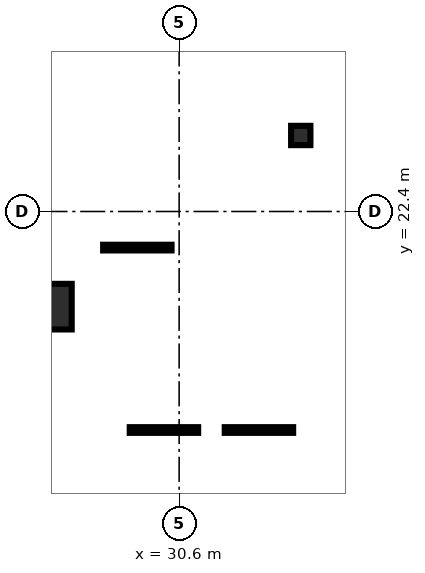
"""IFC4 building model, lengths in metres.
Left out: names, types, materials, properties, quantities, classifications, styles, units other than length and angle.
Written with IfcOpenShell. Run it as: python <this file> out.ifc"""

import sys

from ifc_helpers import new_model, si_unit, direction, frame, origin, origin_2d, place, context, subcontext, project, spatial, hollow_rectangle, hollow_circle, extrude, element, save


model = new_model("IFC4")
c1 = context("Model", 3, precision=1e-05, world=origin(), true_north=direction((0.0, 1.0)))
c2 = subcontext(c1, "Body", "Model", "MODEL_VIEW")
j1 = project(units=[si_unit("LENGTHUNIT", "METRE"), si_unit("PLANEANGLEUNIT", "RADIAN")], contexts=[c1])
p1 = place(None, origin())
s1 = spatial("IfcSite", under=j1, at=p1, CompositionType="ELEMENT")
p2 = place(p1, origin())
s2 = spatial("IfcBuilding", under=s1, at=p2, CompositionType="ELEMENT")
p3 = place(p2, frame((0.0, 0.0, -8.16)))
s3 = spatial("IfcBuildingStorey", under=s2, at=p3, CompositionType="ELEMENT", Elevation=-8.16)
p4 = place(p3, frame((27.173, 19.896, 0.0), z_axis=(0.0, 0.0, 1.0), x_axis=(1.0, 0.0, 0.0)))
e1 = element("IfcColumn", 1, at=p4, inside=s3, PredefinedType="COLUMN", context=c2, shape_type="SweptSolid", body=[
    extrude(hollow_rectangle(XDim=1.2, YDim=1.2, WallThickness=0.06, at=origin_2d()), origin(), (0.0, 0.0, 1.0), 3.76),
])
p5 = place(p3, frame((33.8, 24.4, 0.0), z_axis=(0.0, 0.0, 1.0), x_axis=(1.0, 0.0, 0.0)))
e2 = element("IfcColumn", 2, at=p5, inside=s3, PredefinedType="COLUMN", context=c2, shape_type="SweptSolid", body=[
    extrude(hollow_circle(Radius=0.254, WallThickness=0.02, at=origin_2d()), origin(), (0.0, 0.0, 1.0), 3.76),
])
save(model, sys.argv[1])
